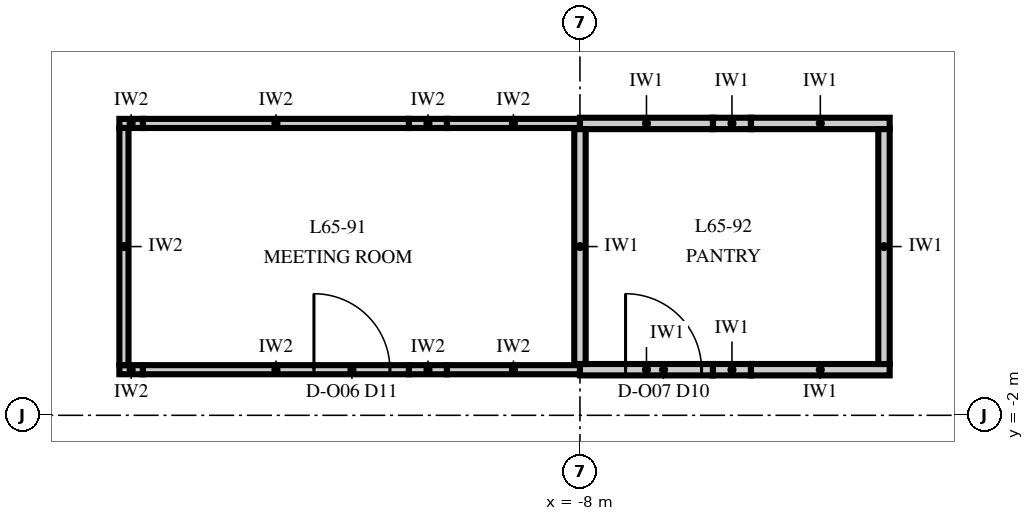
"""IFC4 building model, lengths in metres.
Left out: names, types, materials, properties, quantities, classifications, styles, units other than length and angle.
Written with IfcOpenShell. Run it as: python <this file> out.ifc"""

import sys

from ifc_helpers import new_model, si_unit, direction, frame, frame_2d, origin, place, context, subcontext, project, spatial, rectangle, extrude, element, fill, save


model = new_model("IFC4")
c1 = context("Model", 3, precision=1e-05, world=origin(), true_north=direction((0.0, 1.0)))
c2 = subcontext(c1, "Body", "Model", "MODEL_VIEW")
j1 = project(units=[si_unit("LENGTHUNIT", "METRE"), si_unit("PLANEANGLEUNIT", "RADIAN")], contexts=[c1])
p1 = place(None, origin())
s1 = spatial("IfcSite", under=j1, at=p1, CompositionType="ELEMENT")
p2 = place(p1, origin())
s2 = spatial("IfcBuilding", under=s1, at=p2, CompositionType="ELEMENT")
p3 = place(p2, frame((0.0, 0.0, 280.0)))
s3 = spatial("IfcBuildingStorey", under=s2, at=p3, CompositionType="ELEMENT", Elevation=280.0)
p4 = place(p3, frame((-14.06, -1.4, 0.0), z_axis=(0.0, 0.0, 1.0), x_axis=(1.0, 0.0, 0.0)))
e1 = element("IfcWall", 1, at=p4, inside=s3, PredefinedType="PARTITIONING", context=c2, shape_type="SweptSolid", body=[
    extrude(rectangle(XDim=0.31, YDim=0.12, at=frame_2d((0.155, 0.0))), origin(), (0.0, 0.0, 1.0), 2.25),
])
p5 = place(p3, frame((-13.75, -1.4, 0.0), z_axis=(0.0, 0.0, 1.0), x_axis=(1.0, 0.0, 0.0)))
e2 = element("IfcWall", 2, at=p5, inside=s3, PredefinedType="PARTITIONING", context=c2, shape_type="SweptSolid", body=[
    extrude(rectangle(XDim=3.5, YDim=0.12, at=frame_2d((1.75, 0.0))), origin(), (0.0, 0.0, 1.0), 3.85),
])
p6 = place(p5, frame((2.25, 0.0, 0.0)))
e3 = element("IfcOpeningElement", 3, at=p6, cuts=e2, PredefinedType="OPENING", context=c2, shape_type="SweptSolid", body=[
    extrude(rectangle(XDim=1.0, YDim=2.4, at=frame_2d((0.5, 1.2))), frame((0.0, 0.075, 0.0), z_axis=(0.0, -1.0, 0.0), x_axis=(1.0, 0.0, 0.0)), (0.0, 0.0, 1.0), 0.15),
])
p7 = place(p3, frame((-10.25, -1.4, 0.0), z_axis=(0.0, 0.0, 1.0), x_axis=(1.0, 0.0, 0.0)))
e4 = element("IfcWall", 4, at=p7, inside=s3, PredefinedType="PARTITIONING", context=c2, shape_type="SweptSolid", body=[
    extrude(rectangle(XDim=0.5, YDim=0.12, at=frame_2d((0.25, 0.0))), origin(), (0.0, 0.0, 1.0), 2.25),
])
p8 = place(p3, frame((-9.75, -1.4, 0.0), z_axis=(0.0, 0.0, 1.0), x_axis=(1.0, 0.0, 0.0)))
e5 = element("IfcWall", 5, at=p8, inside=s3, PredefinedType="PARTITIONING", context=c2, shape_type="SweptSolid", body=[
    extrude(rectangle(XDim=1.75, YDim=0.12, at=frame_2d((0.875, 0.0))), origin(), (0.0, 0.0, 1.0), 3.85),
])
p9 = place(p3, frame((-8.0, -1.4, 0.0), z_axis=(0.0, 0.0, 1.0), x_axis=(1.0, 0.0, 0.0)))
e6 = element("IfcWall", 6, at=p9, inside=s3, PredefinedType="PARTITIONING", context=c2, shape_type="SweptSolid", body=[
    extrude(rectangle(XDim=1.75, YDim=0.15, at=frame_2d((0.875, 0.0))), origin(), (0.0, 0.0, 1.0), 3.85),
])
p10 = place(p9, frame((0.6, 0.0, 0.0)))
e7 = element("IfcOpeningElement", 7, at=p10, cuts=e6, PredefinedType="OPENING", context=c2, shape_type="SweptSolid", body=[
    extrude(rectangle(XDim=1.0, YDim=2.3, at=frame_2d((0.5, 1.15))), frame((0.0, 0.09, 0.0), z_axis=(0.0, -1.0, 0.0), x_axis=(1.0, 0.0, 0.0)), (0.0, 0.0, 1.0), 0.18),
])
p11 = place(p3, frame((-6.25, -1.4, 0.0), z_axis=(0.0, 0.0, 1.0), x_axis=(1.0, 0.0, 0.0)))
e8 = element("IfcWall", 8, at=p11, inside=s3, PredefinedType="PARTITIONING", context=c2, shape_type="SweptSolid", body=[
    extrude(rectangle(XDim=0.5, YDim=0.15, at=frame_2d((0.25, 0.0))), origin(), (0.0, 0.0, 1.0), 2.25),
])
p12 = place(p3, frame((-5.75, -1.4, 0.0), z_axis=(0.0, 0.0, 1.0), x_axis=(1.0, 0.0, 0.0)))
e9 = element("IfcWall", 9, at=p12, inside=s3, PredefinedType="PARTITIONING", context=c2, shape_type="SweptSolid", body=[
    extrude(rectangle(XDim=1.825, YDim=0.15, at=frame_2d((0.913, 0.0))), origin(), (0.0, 0.0, 1.0), 3.85),
])
p13 = place(p3, frame((-14.06, 1.84, 0.0), z_axis=(0.0, 0.0, 1.0), x_axis=(1.0, 0.0, 0.0)))
e10 = element("IfcWall", 10, at=p13, inside=s3, PredefinedType="PARTITIONING", context=c2, shape_type="SweptSolid", body=[
    extrude(rectangle(XDim=0.31, YDim=0.12, at=frame_2d((0.155, 0.0))), origin(), (0.0, 0.0, 1.0), 2.25),
])
p14 = place(p3, frame((-13.75, 1.84, 0.0), z_axis=(0.0, 0.0, 1.0), x_axis=(1.0, 0.0, 0.0)))
e11 = element("IfcWall", 11, at=p14, inside=s3, PredefinedType="PARTITIONING", context=c2, shape_type="SweptSolid", body=[
    extrude(rectangle(XDim=3.5, YDim=0.12, at=frame_2d((1.75, 0.0))), origin(), (0.0, 0.0, 1.0), 3.85),
])
p15 = place(p3, frame((-10.25, 1.84, 0.0), z_axis=(0.0, 0.0, 1.0), x_axis=(1.0, 0.0, 0.0)))
e12 = element("IfcWall", 12, at=p15, inside=s3, PredefinedType="PARTITIONING", context=c2, shape_type="SweptSolid", body=[
    extrude(rectangle(XDim=0.5, YDim=0.12, at=frame_2d((0.25, 0.0))), origin(), (0.0, 0.0, 1.0), 2.25),
])
p16 = place(p3, frame((-9.75, 1.84, 0.0), z_axis=(0.0, 0.0, 1.0), x_axis=(1.0, 0.0, 0.0)))
e13 = element("IfcWall", 13, at=p16, inside=s3, PredefinedType="PARTITIONING", context=c2, shape_type="SweptSolid", body=[
    extrude(rectangle(XDim=1.75, YDim=0.12, at=frame_2d((0.875, 0.0))), origin(), (0.0, 0.0, 1.0), 3.85),
])
p17 = place(p3, frame((-8.0, 1.84, 0.0), z_axis=(0.0, 0.0, 1.0), x_axis=(1.0, 0.0, 0.0)))
e14 = element("IfcWall", 14, at=p17, inside=s3, PredefinedType="PARTITIONING", context=c2, shape_type="SweptSolid", body=[
    extrude(rectangle(XDim=1.75, YDim=0.15, at=frame_2d((0.875, 0.0))), origin(), (0.0, 0.0, 1.0), 3.85),
])
p18 = place(p3, frame((-6.25, 1.84, 0.0), z_axis=(0.0, 0.0, 1.0), x_axis=(1.0, 0.0, 0.0)))
e15 = element("IfcWall", 15, at=p18, inside=s3, PredefinedType="PARTITIONING", context=c2, shape_type="SweptSolid", body=[
    extrude(rectangle(XDim=0.5, YDim=0.15, at=frame_2d((0.25, 0.0))), origin(), (0.0, 0.0, 1.0), 2.25),
])
p19 = place(p3, frame((-5.75, 1.84, 0.0), z_axis=(0.0, 0.0, 1.0), x_axis=(1.0, 0.0, 0.0)))
e16 = element("IfcWall", 16, at=p19, inside=s3, PredefinedType="PARTITIONING", context=c2, shape_type="SweptSolid", body=[
    extrude(rectangle(XDim=1.825, YDim=0.15, at=frame_2d((0.913, 0.0))), origin(), (0.0, 0.0, 1.0), 3.85),
])
p20 = place(p3, frame((-14.0, -1.34, 0.0), z_axis=(0.0, 0.0, 1.0), x_axis=(0.0, 1.0, 0.0)))
e17 = element("IfcWall", 17, at=p20, inside=s3, PredefinedType="PARTITIONING", context=c2, shape_type="SweptSolid", body=[
    extrude(rectangle(XDim=3.12, YDim=0.12, at=frame_2d((1.56, 0.0))), origin(), (0.0, 0.0, 1.0), 2.25),
])
for number, where, z_axis, x_axis in (
    (18, (-8.0, -1.325, 0.0), (0.0, 0.0, 1.0), (0.0, 1.0, 0.0)),
    (19, (-4.0, -1.325, 0.0), (0.0, 0.0, 1.0), (0.0, 1.0, 0.0)),
):
    element("IfcWall", number, at=place(p3, frame(where, z_axis=z_axis, x_axis=x_axis)), inside=s3, PredefinedType="PARTITIONING", context=c2, shape_type="SweptSolid", body=[
        extrude(rectangle(XDim=3.09, YDim=0.15, at=frame_2d((1.545, 0.0))), origin(), (0.0, 0.0, 1.0), 3.85),
    ])
p21 = place(p6, origin())
e20 = element("IfcDoor", 20, at=p21, inside=s3, OperationType="SINGLE_SWING_RIGHT", PredefinedType="DOOR", context=c2, shape_type="SweptSolid", body=[
    extrude(rectangle(XDim=1.0, YDim=2.4, at=frame_2d((0.5, 1.2))), frame((0.0, 0.06, 0.0), z_axis=(0.0, -1.0, 0.0), x_axis=(1.0, 0.0, 0.0)), (0.0, 0.0, 1.0), 0.12),
])
fill(e3, e20)
p22 = place(p10, origin())
e21 = element("IfcDoor", 21, at=p22, inside=s3, OperationType="SINGLE_SWING_LEFT", PredefinedType="DOOR", context=c2, shape_type="SweptSolid", body=[
    extrude(rectangle(XDim=1.0, YDim=2.3, at=frame_2d((0.5, 1.15))), frame((0.0, 0.075, 0.0), z_axis=(0.0, -1.0, 0.0), x_axis=(1.0, 0.0, 0.0)), (0.0, 0.0, 1.0), 0.149),
])
fill(e7, e21)
save(model, sys.argv[1])
